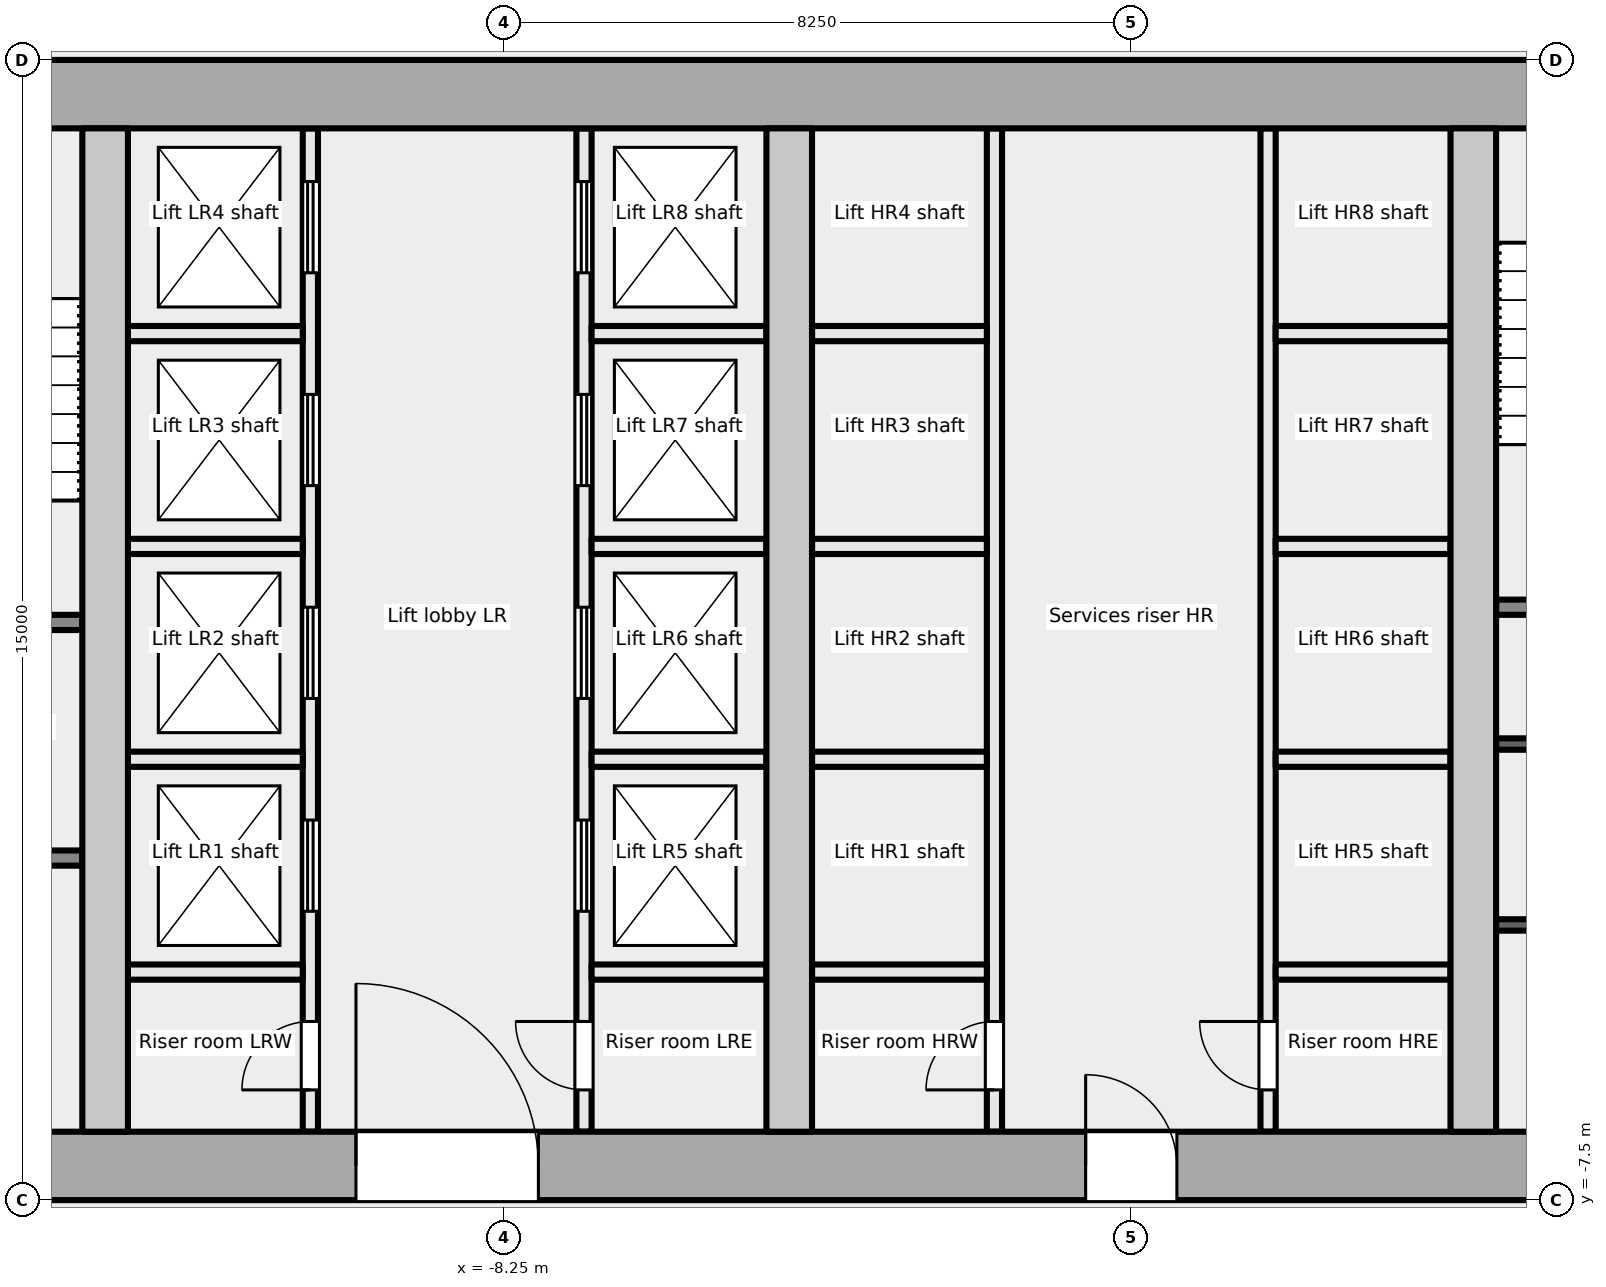
"""IFC4 building model, lengths in metres.
Left out: names, types, materials, properties, quantities, classifications, styles, units other than length and angle.
Written with IfcOpenShell. Run it as: python <this file> out.ifc"""

import sys

from ifc_helpers import new_model, si_unit, direction, frame, frame_2d, origin, place, context, subcontext, project, spatial, rectangle, extrude, element, fill, save


model = new_model("IFC4")
c1 = context("Model", 3, precision=1e-05, world=origin(), true_north=direction((0.0, 1.0)))
c2 = subcontext(c1, "Body", "Model", "MODEL_VIEW")
j1 = project(units=[si_unit("LENGTHUNIT", "METRE"), si_unit("PLANEANGLEUNIT", "RADIAN")], contexts=[c1])
p1 = place(None, origin())
s1 = spatial("IfcSite", under=j1, at=p1, CompositionType="ELEMENT")
p2 = place(p1, origin())
s2 = spatial("IfcBuilding", under=s1, at=p2, CompositionType="ELEMENT")
p3 = place(p2, frame((0.0, 0.0, 27.0)))
s3 = spatial("IfcBuildingStorey", under=s2, at=p3, CompositionType="ELEMENT", Elevation=27.0)
p4 = place(p3, frame((-18.0, -7.05, -0.2), z_axis=(0.0, 0.0, 1.0), x_axis=(1.0, 0.0, 0.0)))
e1 = element("IfcWall", 1, at=p4, inside=s3, PredefinedType="SHEAR", context=c2, shape_type="SweptSolid", body=[
    extrude(rectangle(XDim=36.0, YDim=0.9, at=frame_2d((18.0, 0.0))), origin(), (0.0, 0.0, 1.0), 5.4),
])
p5 = place(p4, frame((7.8, 0.0, 0.2)))
e2 = element("IfcOpeningElement", 2, at=p5, cuts=e1, PredefinedType="OPENING", context=c2, shape_type="SweptSolid", body=[
    extrude(rectangle(XDim=2.4, YDim=2.1, at=frame_2d((1.2, 1.05))), frame((0.0, 0.46, 0.0), z_axis=(0.0, -1.0, 0.0), x_axis=(1.0, 0.0, 0.0)), (0.0, 0.0, 1.0), 0.921),
])
p6 = place(p4, frame((17.4, 0.0, 0.2)))
e3 = element("IfcOpeningElement", 3, at=p6, cuts=e1, PredefinedType="OPENING", context=c2, shape_type="SweptSolid", body=[
    extrude(rectangle(XDim=1.2, YDim=2.1, at=frame_2d((0.6, 1.05))), frame((0.0, 0.46, 0.0), z_axis=(0.0, -1.0, 0.0), x_axis=(1.0, 0.0, 0.0)), (0.0, 0.0, 1.0), 0.921),
])
p7 = place(p4, frame((26.1, 0.0, 0.2)))
e4 = element("IfcOpeningElement", 4, at=p7, cuts=e1, PredefinedType="OPENING", context=c2, shape_type="SweptSolid", body=[
    extrude(rectangle(XDim=2.4, YDim=2.1, at=frame_2d((1.2, 1.05))), frame((0.0, 0.46, 0.0), z_axis=(0.0, -1.0, 0.0), x_axis=(1.0, 0.0, 0.0)), (0.0, 0.0, 1.0), 0.921),
])
p8 = place(p3, frame((-18.0, 7.05, -0.2), z_axis=(0.0, 0.0, 1.0), x_axis=(1.0, 0.0, 0.0)))
e5 = element("IfcWall", 5, at=p8, inside=s3, PredefinedType="SHEAR", context=c2, shape_type="SweptSolid", body=[
    extrude(rectangle(XDim=36.0, YDim=0.9, at=frame_2d((18.0, 0.0))), origin(), (0.0, 0.0, 1.0), 5.4),
])
for number, where, z_axis, x_axis in (
    (6, (-13.5, -6.6, -0.2), (0.0, 0.0, 1.0), (0.0, 1.0, 0.0)),
    (7, (-4.5, -6.6, -0.2), (0.0, 0.0, 1.0), (0.0, 1.0, 0.0)),
    (8, (4.5, -6.6, -0.2), (0.0, 0.0, 1.0), (0.0, 1.0, 0.0)),
):
    element("IfcWall", number, at=place(p3, frame(where, z_axis=z_axis, x_axis=x_axis)), inside=s3, PredefinedType="SHEAR", context=c2, shape_type="SweptSolid", body=[
        extrude(rectangle(XDim=13.2, YDim=0.6, at=frame_2d((6.6, 0.0))), origin(), (0.0, 0.0, 1.0), 5.4),
    ])
p9 = place(p3, frame((-17.1, -3.0, 0.0), z_axis=(0.0, 0.0, 1.0), x_axis=(1.0, 0.0, 0.0)))
e9 = element("IfcWall", 9, at=p9, inside=s3, PredefinedType="PARTITIONING", context=c2, shape_type="SweptSolid", body=[
    extrude(rectangle(XDim=3.3, YDim=0.2, at=frame_2d((1.65, 0.0))), origin(), (0.0, 0.0, 1.0), 5.2),
])
p10 = place(p9, frame((1.1, 0.0, 0.0)))
e10 = element("IfcOpeningElement", 10, at=p10, cuts=e9, PredefinedType="OPENING", context=c2, shape_type="SweptSolid", body=[
    extrude(rectangle(XDim=1.1, YDim=2.1, at=frame_2d((0.55, 1.05))), frame((0.0, 0.111, 0.0), z_axis=(0.0, -1.0, 0.0), x_axis=(1.0, 0.0, 0.0)), (0.0, 0.0, 1.0), 0.221),
])
p11 = place(p3, frame((-17.1, 0.1, 0.0), z_axis=(0.0, 0.0, 1.0), x_axis=(1.0, 0.0, 0.0)))
e11 = element("IfcWall", 11, at=p11, inside=s3, PredefinedType="PARTITIONING", context=c2, shape_type="SweptSolid", body=[
    extrude(rectangle(XDim=3.3, YDim=0.2, at=frame_2d((1.65, 0.0))), origin(), (0.0, 0.0, 1.0), 5.2),
])
p12 = place(p11, frame((1.1, 0.0, 0.0)))
e12 = element("IfcOpeningElement", 12, at=p12, cuts=e11, PredefinedType="OPENING", context=c2, shape_type="SweptSolid", body=[
    extrude(rectangle(XDim=1.1, YDim=2.1, at=frame_2d((0.55, 1.05))), frame((0.0, 0.111, 0.0), z_axis=(0.0, -1.0, 0.0), x_axis=(1.0, 0.0, 0.0)), (0.0, 0.0, 1.0), 0.221),
])
p13 = place(p3, frame((-10.8, -6.6, 0.0), z_axis=(0.0, 0.0, 1.0), x_axis=(0.0, 1.0, 0.0)))
e13 = element("IfcWall", 13, at=p13, inside=s3, PredefinedType="PARTITIONING", context=c2, shape_type="SweptSolid", body=[
    extrude(rectangle(XDim=13.2, YDim=0.2, at=frame_2d((6.6, 0.0))), origin(), (0.0, 0.0, 1.0), 5.2),
])
p14 = place(p13, frame((0.55, 0.0, 0.0)))
e14 = element("IfcOpeningElement", 14, at=p14, cuts=e13, PredefinedType="OPENING", context=c2, shape_type="SweptSolid", body=[
    extrude(rectangle(XDim=0.9, YDim=2.1, at=frame_2d((0.45, 1.05))), frame((0.0, 0.111, 0.0), z_axis=(0.0, -1.0, 0.0), x_axis=(1.0, 0.0, 0.0)), (0.0, 0.0, 1.0), 0.221),
])
p15 = place(p13, frame((2.9, 0.0, 0.0)))
e15 = element("IfcOpeningElement", 15, at=p15, cuts=e13, PredefinedType="OPENING", context=c2, shape_type="SweptSolid", body=[
    extrude(rectangle(XDim=1.2, YDim=2.1, at=frame_2d((0.6, 1.05))), frame((0.0, 0.111, 0.0), z_axis=(0.0, -1.0, 0.0), x_axis=(1.0, 0.0, 0.0)), (0.0, 0.0, 1.0), 0.221),
])
p16 = place(p13, frame((5.7, 0.0, 0.0)))
e16 = element("IfcOpeningElement", 16, at=p16, cuts=e13, PredefinedType="OPENING", context=c2, shape_type="SweptSolid", body=[
    extrude(rectangle(XDim=1.2, YDim=2.1, at=frame_2d((0.6, 1.05))), frame((0.0, 0.111, 0.0), z_axis=(0.0, -1.0, 0.0), x_axis=(1.0, 0.0, 0.0)), (0.0, 0.0, 1.0), 0.221),
])
p17 = place(p13, frame((8.5, 0.0, 0.0)))
e17 = element("IfcOpeningElement", 17, at=p17, cuts=e13, PredefinedType="OPENING", context=c2, shape_type="SweptSolid", body=[
    extrude(rectangle(XDim=1.2, YDim=2.1, at=frame_2d((0.6, 1.05))), frame((0.0, 0.111, 0.0), z_axis=(0.0, -1.0, 0.0), x_axis=(1.0, 0.0, 0.0)), (0.0, 0.0, 1.0), 0.221),
])
p18 = place(p13, frame((11.3, 0.0, 0.0)))
e18 = element("IfcOpeningElement", 18, at=p18, cuts=e13, PredefinedType="OPENING", context=c2, shape_type="SweptSolid", body=[
    extrude(rectangle(XDim=1.2, YDim=2.1, at=frame_2d((0.6, 1.05))), frame((0.0, 0.111, 0.0), z_axis=(0.0, -1.0, 0.0), x_axis=(1.0, 0.0, 0.0)), (0.0, 0.0, 1.0), 0.221),
])
p19 = place(p3, frame((-7.2, -6.6, 0.0), z_axis=(0.0, 0.0, 1.0), x_axis=(0.0, 1.0, 0.0)))
e19 = element("IfcWall", 19, at=p19, inside=s3, PredefinedType="PARTITIONING", context=c2, shape_type="SweptSolid", body=[
    extrude(rectangle(XDim=13.2, YDim=0.2, at=frame_2d((6.6, 0.0))), origin(), (0.0, 0.0, 1.0), 5.2),
])
p20 = place(p19, frame((0.55, 0.0, 0.0)))
e20 = element("IfcOpeningElement", 20, at=p20, cuts=e19, PredefinedType="OPENING", context=c2, shape_type="SweptSolid", body=[
    extrude(rectangle(XDim=0.9, YDim=2.1, at=frame_2d((0.45, 1.05))), frame((0.0, 0.111, 0.0), z_axis=(0.0, -1.0, 0.0), x_axis=(1.0, 0.0, 0.0)), (0.0, 0.0, 1.0), 0.221),
])
p21 = place(p19, frame((2.9, 0.0, 0.0)))
e21 = element("IfcOpeningElement", 21, at=p21, cuts=e19, PredefinedType="OPENING", context=c2, shape_type="SweptSolid", body=[
    extrude(rectangle(XDim=1.2, YDim=2.1, at=frame_2d((0.6, 1.05))), frame((0.0, 0.111, 0.0), z_axis=(0.0, -1.0, 0.0), x_axis=(1.0, 0.0, 0.0)), (0.0, 0.0, 1.0), 0.221),
])
p22 = place(p19, frame((5.7, 0.0, 0.0)))
e22 = element("IfcOpeningElement", 22, at=p22, cuts=e19, PredefinedType="OPENING", context=c2, shape_type="SweptSolid", body=[
    extrude(rectangle(XDim=1.2, YDim=2.1, at=frame_2d((0.6, 1.05))), frame((0.0, 0.111, 0.0), z_axis=(0.0, -1.0, 0.0), x_axis=(1.0, 0.0, 0.0)), (0.0, 0.0, 1.0), 0.221),
])
p23 = place(p19, frame((8.5, 0.0, 0.0)))
e23 = element("IfcOpeningElement", 23, at=p23, cuts=e19, PredefinedType="OPENING", context=c2, shape_type="SweptSolid", body=[
    extrude(rectangle(XDim=1.2, YDim=2.1, at=frame_2d((0.6, 1.05))), frame((0.0, 0.111, 0.0), z_axis=(0.0, -1.0, 0.0), x_axis=(1.0, 0.0, 0.0)), (0.0, 0.0, 1.0), 0.221),
])
p24 = place(p19, frame((11.3, 0.0, 0.0)))
e24 = element("IfcOpeningElement", 24, at=p24, cuts=e19, PredefinedType="OPENING", context=c2, shape_type="SweptSolid", body=[
    extrude(rectangle(XDim=1.2, YDim=2.1, at=frame_2d((0.6, 1.05))), frame((0.0, 0.111, 0.0), z_axis=(0.0, -1.0, 0.0), x_axis=(1.0, 0.0, 0.0)), (0.0, 0.0, 1.0), 0.221),
])
for number, where, z_axis, x_axis in (
    (25, (-13.2, -1.7, 0.0), (0.0, 0.0, 1.0), (1.0, 0.0, 0.0)),
    (26, (-13.2, 1.1, 0.0), (0.0, 0.0, 1.0), (1.0, 0.0, 0.0)),
    (27, (-13.2, 3.9, 0.0), (0.0, 0.0, 1.0), (1.0, 0.0, 0.0)),
    (28, (-13.2, -4.5, 0.0), (0.0, 0.0, 1.0), (1.0, 0.0, 0.0)),
    (29, (-7.1, -1.7, 0.0), (0.0, 0.0, 1.0), (1.0, 0.0, 0.0)),
    (30, (-7.1, 1.1, 0.0), (0.0, 0.0, 1.0), (1.0, 0.0, 0.0)),
    (31, (-7.1, 3.9, 0.0), (0.0, 0.0, 1.0), (1.0, 0.0, 0.0)),
    (32, (-7.1, -4.5, 0.0), (0.0, 0.0, 1.0), (1.0, 0.0, 0.0)),
):
    element("IfcWall", number, at=place(p3, frame(where, z_axis=z_axis, x_axis=x_axis)), inside=s3, PredefinedType="PARTITIONING", context=c2, shape_type="SweptSolid", body=[
        extrude(rectangle(XDim=2.3, YDim=0.2, at=frame_2d((1.15, 0.0))), origin(), (0.0, 0.0, 1.0), 5.2),
    ])
p25 = place(p3, frame((-1.8, -6.6, 0.0), z_axis=(0.0, 0.0, 1.0), x_axis=(0.0, 1.0, 0.0)))
e33 = element("IfcWall", 33, at=p25, inside=s3, PredefinedType="PARTITIONING", context=c2, shape_type="SweptSolid", body=[
    extrude(rectangle(XDim=13.2, YDim=0.2, at=frame_2d((6.6, 0.0))), origin(), (0.0, 0.0, 1.0), 5.2),
])
p26 = place(p25, frame((0.55, 0.0, 0.0)))
e34 = element("IfcOpeningElement", 34, at=p26, cuts=e33, PredefinedType="OPENING", context=c2, shape_type="SweptSolid", body=[
    extrude(rectangle(XDim=0.9, YDim=2.1, at=frame_2d((0.45, 1.05))), frame((0.0, 0.111, 0.0), z_axis=(0.0, -1.0, 0.0), x_axis=(1.0, 0.0, 0.0)), (0.0, 0.0, 1.0), 0.221),
])
p27 = place(p3, frame((1.8, -6.6, 0.0), z_axis=(0.0, 0.0, 1.0), x_axis=(0.0, 1.0, 0.0)))
e35 = element("IfcWall", 35, at=p27, inside=s3, PredefinedType="PARTITIONING", context=c2, shape_type="SweptSolid", body=[
    extrude(rectangle(XDim=13.2, YDim=0.2, at=frame_2d((6.6, 0.0))), origin(), (0.0, 0.0, 1.0), 5.2),
])
p28 = place(p27, frame((0.55, 0.0, 0.0)))
e36 = element("IfcOpeningElement", 36, at=p28, cuts=e35, PredefinedType="OPENING", context=c2, shape_type="SweptSolid", body=[
    extrude(rectangle(XDim=0.9, YDim=2.1, at=frame_2d((0.45, 1.05))), frame((0.0, 0.111, 0.0), z_axis=(0.0, -1.0, 0.0), x_axis=(1.0, 0.0, 0.0)), (0.0, 0.0, 1.0), 0.221),
])
for number, where, z_axis, x_axis in (
    (37, (-4.2, -1.7, 0.0), (0.0, 0.0, 1.0), (1.0, 0.0, 0.0)),
    (38, (-4.2, 1.1, 0.0), (0.0, 0.0, 1.0), (1.0, 0.0, 0.0)),
    (39, (-4.2, 3.9, 0.0), (0.0, 0.0, 1.0), (1.0, 0.0, 0.0)),
    (40, (-4.2, -4.5, 0.0), (0.0, 0.0, 1.0), (1.0, 0.0, 0.0)),
    (41, (1.9, -1.7, 0.0), (0.0, 0.0, 1.0), (1.0, 0.0, 0.0)),
    (42, (1.9, 1.1, 0.0), (0.0, 0.0, 1.0), (1.0, 0.0, 0.0)),
    (43, (1.9, 3.9, 0.0), (0.0, 0.0, 1.0), (1.0, 0.0, 0.0)),
    (44, (1.9, -4.5, 0.0), (0.0, 0.0, 1.0), (1.0, 0.0, 0.0)),
):
    element("IfcWall", number, at=place(p3, frame(where, z_axis=z_axis, x_axis=x_axis)), inside=s3, PredefinedType="PARTITIONING", context=c2, shape_type="SweptSolid", body=[
        extrude(rectangle(XDim=2.3, YDim=0.2, at=frame_2d((1.15, 0.0))), origin(), (0.0, 0.0, 1.0), 5.2),
    ])
p29 = place(p3, frame((4.8, 0.3, 0.0), z_axis=(0.0, 0.0, 1.0), x_axis=(1.0, 0.0, 0.0)))
e45 = element("IfcWall", 45, at=p29, inside=s3, PredefinedType="PARTITIONING", context=c2, shape_type="SweptSolid", body=[
    extrude(rectangle(XDim=3.15, YDim=0.2, at=frame_2d((1.575, 0.0))), origin(), (0.0, 0.0, 1.0), 5.2),
])
for number, where, z_axis, x_axis in (
    (46, (4.8, -3.88, 0.0), (0.0, 0.0, 1.0), (1.0, 0.0, 0.0)),
    (47, (4.8, -1.5, 0.0), (0.0, 0.0, 1.0), (1.0, 0.0, 0.0)),
):
    element("IfcWall", number, at=place(p3, frame(where, z_axis=z_axis, x_axis=x_axis)), inside=s3, PredefinedType="PARTITIONING", context=c2, shape_type="SweptSolid", body=[
        extrude(rectangle(XDim=3.15, YDim=0.15, at=frame_2d((1.575, 0.0))), origin(), (0.0, 0.0, 1.0), 5.2),
    ])
p30 = place(p14, origin())
e48 = element("IfcDoor", 48, at=p30, inside=s3, OperationType="SINGLE_SWING_LEFT", PredefinedType="DOOR", context=c2, shape_type="SweptSolid", body=[
    extrude(rectangle(XDim=0.9, YDim=2.1, at=frame_2d((0.45, 1.05))), frame((0.0, 0.025, 0.0), z_axis=(0.0, -1.0, 0.0), x_axis=(1.0, 0.0, 0.0)), (0.0, 0.0, 1.0), 0.05),
])
fill(e14, e48)
p31 = place(p15, origin())
e49 = element("IfcDoor", 49, at=p31, inside=s3, OperationType="DOUBLE_DOOR_SLIDING", PredefinedType="DOOR", context=c2, shape_type="SweptSolid", body=[
    extrude(rectangle(XDim=1.2, YDim=2.1, at=frame_2d((0.6, 1.05))), frame((0.0, 0.025, 0.0), z_axis=(0.0, -1.0, 0.0), x_axis=(1.0, 0.0, 0.0)), (0.0, 0.0, 1.0), 0.05),
])
fill(e15, e49)
p32 = place(p16, origin())
e50 = element("IfcDoor", 50, at=p32, inside=s3, OperationType="DOUBLE_DOOR_SLIDING", PredefinedType="DOOR", context=c2, shape_type="SweptSolid", body=[
    extrude(rectangle(XDim=1.2, YDim=2.1, at=frame_2d((0.6, 1.05))), frame((0.0, 0.025, 0.0), z_axis=(0.0, -1.0, 0.0), x_axis=(1.0, 0.0, 0.0)), (0.0, 0.0, 1.0), 0.05),
])
fill(e16, e50)
p33 = place(p17, origin())
e51 = element("IfcDoor", 51, at=p33, inside=s3, OperationType="DOUBLE_DOOR_SLIDING", PredefinedType="DOOR", context=c2, shape_type="SweptSolid", body=[
    extrude(rectangle(XDim=1.2, YDim=2.1, at=frame_2d((0.6, 1.05))), frame((0.0, 0.025, 0.0), z_axis=(0.0, -1.0, 0.0), x_axis=(1.0, 0.0, 0.0)), (0.0, 0.0, 1.0), 0.05),
])
fill(e17, e51)
p34 = place(p18, origin())
e52 = element("IfcDoor", 52, at=p34, inside=s3, OperationType="DOUBLE_DOOR_SLIDING", PredefinedType="DOOR", context=c2, shape_type="SweptSolid", body=[
    extrude(rectangle(XDim=1.2, YDim=2.1, at=frame_2d((0.6, 1.05))), frame((0.0, 0.025, 0.0), z_axis=(0.0, -1.0, 0.0), x_axis=(1.0, 0.0, 0.0)), (0.0, 0.0, 1.0), 0.05),
])
fill(e18, e52)
p35 = place(p20, origin())
e53 = element("IfcDoor", 53, at=p35, inside=s3, OperationType="SINGLE_SWING_RIGHT", PredefinedType="DOOR", context=c2, shape_type="SweptSolid", body=[
    extrude(rectangle(XDim=0.9, YDim=2.1, at=frame_2d((0.45, 1.05))), frame((0.0, 0.025, 0.0), z_axis=(0.0, -1.0, 0.0), x_axis=(1.0, 0.0, 0.0)), (0.0, 0.0, 1.0), 0.05),
])
fill(e20, e53)
p36 = place(p21, origin())
e54 = element("IfcDoor", 54, at=p36, inside=s3, OperationType="DOUBLE_DOOR_SLIDING", PredefinedType="DOOR", context=c2, shape_type="SweptSolid", body=[
    extrude(rectangle(XDim=1.2, YDim=2.1, at=frame_2d((0.6, 1.05))), frame((0.0, 0.025, 0.0), z_axis=(0.0, -1.0, 0.0), x_axis=(1.0, 0.0, 0.0)), (0.0, 0.0, 1.0), 0.05),
])
fill(e21, e54)
p37 = place(p22, origin())
e55 = element("IfcDoor", 55, at=p37, inside=s3, OperationType="DOUBLE_DOOR_SLIDING", PredefinedType="DOOR", context=c2, shape_type="SweptSolid", body=[
    extrude(rectangle(XDim=1.2, YDim=2.1, at=frame_2d((0.6, 1.05))), frame((0.0, 0.025, 0.0), z_axis=(0.0, -1.0, 0.0), x_axis=(1.0, 0.0, 0.0)), (0.0, 0.0, 1.0), 0.05),
])
fill(e22, e55)
p38 = place(p23, origin())
e56 = element("IfcDoor", 56, at=p38, inside=s3, OperationType="DOUBLE_DOOR_SLIDING", PredefinedType="DOOR", context=c2, shape_type="SweptSolid", body=[
    extrude(rectangle(XDim=1.2, YDim=2.1, at=frame_2d((0.6, 1.05))), frame((0.0, 0.025, 0.0), z_axis=(0.0, -1.0, 0.0), x_axis=(1.0, 0.0, 0.0)), (0.0, 0.0, 1.0), 0.05),
])
fill(e23, e56)
p39 = place(p24, origin())
e57 = element("IfcDoor", 57, at=p39, inside=s3, OperationType="DOUBLE_DOOR_SLIDING", PredefinedType="DOOR", context=c2, shape_type="SweptSolid", body=[
    extrude(rectangle(XDim=1.2, YDim=2.1, at=frame_2d((0.6, 1.05))), frame((0.0, 0.025, 0.0), z_axis=(0.0, -1.0, 0.0), x_axis=(1.0, 0.0, 0.0)), (0.0, 0.0, 1.0), 0.05),
])
fill(e24, e57)
p40 = place(p5, origin())
e58 = element("IfcDoor", 58, at=p40, inside=s3, OperationType="DOUBLE_DOOR_DOUBLE_SWING", PredefinedType="DOOR", context=c2, shape_type="SweptSolid", body=[
    extrude(rectangle(XDim=2.4, YDim=2.1, at=frame_2d((1.2, 1.05))), frame((0.0, 0.025, 0.0), z_axis=(0.0, -1.0, 0.0), x_axis=(1.0, 0.0, 0.0)), (0.0, 0.0, 1.0), 0.05),
])
fill(e2, e58)
p41 = place(p26, origin())
e59 = element("IfcDoor", 59, at=p41, inside=s3, OperationType="SINGLE_SWING_LEFT", PredefinedType="DOOR", context=c2, shape_type="SweptSolid", body=[
    extrude(rectangle(XDim=0.9, YDim=2.1, at=frame_2d((0.45, 1.05))), frame((0.0, 0.025, 0.0), z_axis=(0.0, -1.0, 0.0), x_axis=(1.0, 0.0, 0.0)), (0.0, 0.0, 1.0), 0.05),
])
fill(e34, e59)
p42 = place(p28, origin())
e60 = element("IfcDoor", 60, at=p42, inside=s3, OperationType="SINGLE_SWING_RIGHT", PredefinedType="DOOR", context=c2, shape_type="SweptSolid", body=[
    extrude(rectangle(XDim=0.9, YDim=2.1, at=frame_2d((0.45, 1.05))), frame((0.0, 0.025, 0.0), z_axis=(0.0, -1.0, 0.0), x_axis=(1.0, 0.0, 0.0)), (0.0, 0.0, 1.0), 0.05),
])
fill(e36, e60)
p43 = place(p6, origin())
e61 = element("IfcDoor", 61, at=p43, inside=s3, OperationType="SINGLE_SWING_LEFT", PredefinedType="DOOR", context=c2, shape_type="SweptSolid", body=[
    extrude(rectangle(XDim=1.2, YDim=2.1, at=frame_2d((0.6, 1.05))), frame((0.0, 0.025, 0.0), z_axis=(0.0, -1.0, 0.0), x_axis=(1.0, 0.0, 0.0)), (0.0, 0.0, 1.0), 0.05),
])
fill(e3, e61)
save(model, sys.argv[1])
